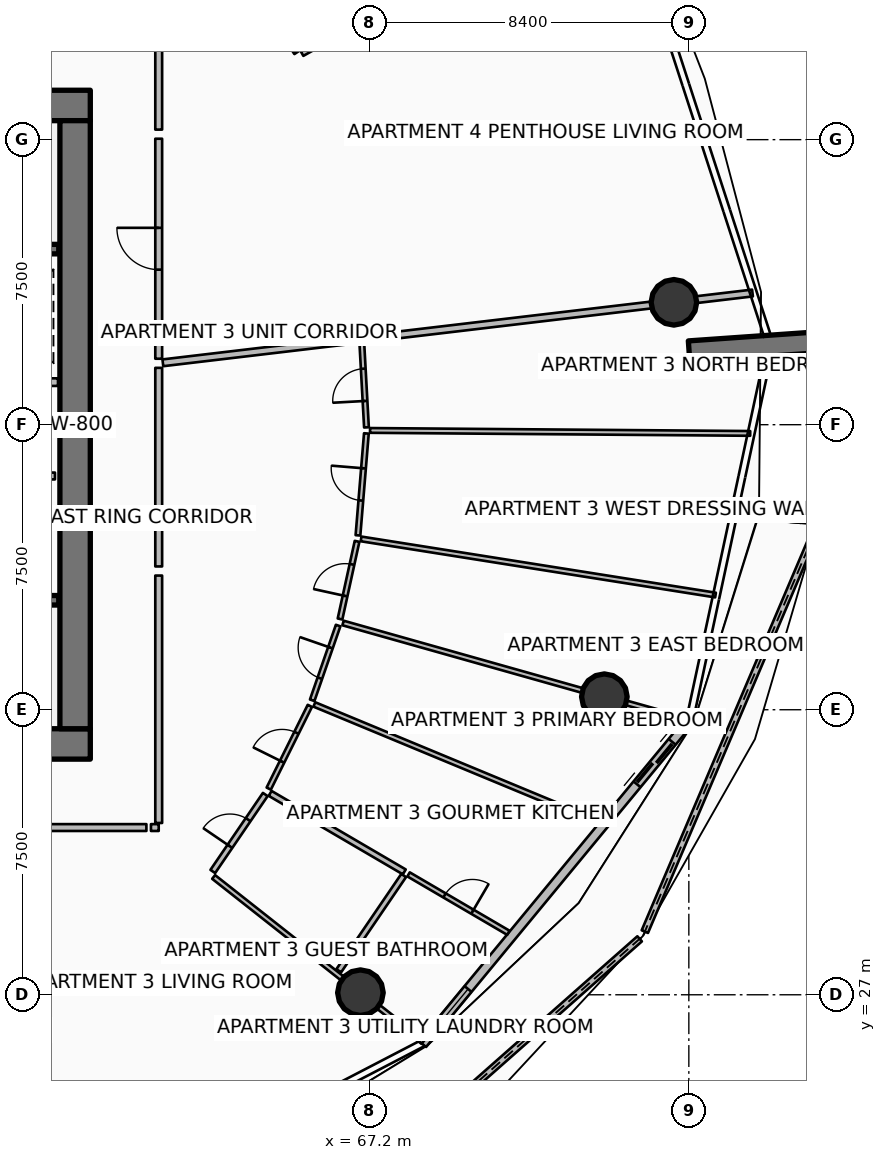
"""IFC4 building model, lengths in metres.
Left out: names, types, materials, properties, quantities, classifications, styles, units other than length and angle.
Written with IfcOpenShell. Run it as: python <this file> out.ifc"""

import sys

from ifc_helpers import new_model, si_unit, direction, frame, frame_2d, origin, origin_2d, place, context, subcontext, project, spatial, polyline, rectangle, circle, outline, extrude, element, fill, save


model = new_model("IFC4")
c1 = context("Model", 3, precision=1e-05, world=origin(), true_north=direction((0.0, 1.0)))
c2 = subcontext(c1, "Body", "Model", "MODEL_VIEW")
j1 = project(units=[si_unit("LENGTHUNIT", "METRE"), si_unit("PLANEANGLEUNIT", "RADIAN")], contexts=[c1])
p1 = place(None, origin())
s1 = spatial("IfcSite", under=j1, at=p1, CompositionType="ELEMENT")
p2 = place(p1, origin())
s2 = spatial("IfcBuilding", under=s1, at=p2, CompositionType="ELEMENT")
p3 = place(p2, frame((0.0, 0.0, 101.4)))
s3 = spatial("IfcBuildingStorey", under=s2, at=p3, CompositionType="ELEMENT", Elevation=101.4)
for number, where, z_axis, x_axis in (
    (1, (49.95, 33.6, 0.0), (0.0, 0.0, 1.0), (1.0, 0.0, 0.0)),
    (2, (49.95, 50.4, 0.0), (0.0, 0.0, 1.0), (1.0, 0.0, 0.0)),
):
    element("IfcWall", number, at=place(p3, frame(where, z_axis=z_axis, x_axis=x_axis)), inside=s3, PredefinedType="SHEAR", context=c2, shape_type="SweptSolid", body=[
        extrude(rectangle(XDim=9.9, YDim=0.8, at=frame_2d((4.95, 0.0))), origin(), (0.0, 0.0, 1.0), 3.75),
    ])
p4 = place(p3, frame((59.45, 34.0, 0.0), z_axis=(0.0, 0.0, 1.0), x_axis=(0.0, 1.0, 0.0)))
e3 = element("IfcWall", 3, at=p4, inside=s3, PredefinedType="SHEAR", context=c2, shape_type="SweptSolid", body=[
    extrude(rectangle(XDim=16.0, YDim=0.8, at=frame_2d((8.0, 0.0))), origin(), (0.0, 0.0, 1.0), 3.75),
])
p5 = place(p3, frame((75.606, 43.93, 0.0), z_axis=(0.0, 0.0, 1.0), x_axis=(0.997564163539, 0.069754853754, 0.0)))
e4 = element("IfcWall", 4, at=p5, inside=s3, PredefinedType="SOLIDWALL", context=c2, shape_type="SweptSolid", body=[
    extrude(rectangle(XDim=3.5, YDim=0.55, at=frame_2d((1.75, 0.0))), origin(), (0.0, 0.0, 1.0), 3.75),
])
for number, where, z_axis, x_axis in (
    (5, (66.958, 27.055, 0.0), (0.0, 0.0, 1.0), (1.0, 0.0, 0.0)),
    (6, (73.377, 34.843, 0.0), (0.0, 0.0, 1.0), (1.0, 0.0, 0.0)),
    (7, (75.207, 45.22, 0.0), (0.0, 0.0, 1.0), (1.0, 0.0, 0.0)),
):
    element("IfcColumn", number, at=place(p3, frame(where, z_axis=z_axis, x_axis=x_axis)), inside=s3, PredefinedType="COLUMN", context=c2, shape_type="SweptSolid", body=[
        extrude(circle(Radius=0.6, at=origin_2d()), origin(), (0.0, 0.0, 1.0), 3.5),
    ])
p6 = place(p3, frame((66.022, 21.158, 0.0), z_axis=(0.0, 0.0, 1.0), x_axis=(0.749623748339, 0.661864212604, 0.0)))
e8 = element("IfcWall", 8, at=p6, inside=s3, PredefinedType="PARAPET", context=c2, shape_type="SweptSolid", body=[
    extrude(outline(polyline([(0.0, 0.0), (11.05, 0.0), (11.05, 1.348), (5.525, 1.562), (0.0, 1.747), (0.0, 0.0)])), frame((0.0, 0.09, 0.0), z_axis=(0.0, -1.0, 0.0), x_axis=(1.0, 0.0, 0.0)), (0.0, 0.0, 1.0), 0.18),
])
p7 = place(p3, frame((74.442, 28.662, 0.0), z_axis=(0.0, 0.0, 1.0), x_axis=(0.391761113394, 0.920066970406, 0.0)))
e9 = element("IfcWall", 9, at=p7, inside=s3, PredefinedType="PARAPET", context=c2, shape_type="SweptSolid", body=[
    extrude(outline(polyline([(0.0, 0.0), (11.638, 0.0), (11.638, 1.12), (5.819, 1.182), (0.0, 1.348), (0.0, 0.0)])), frame((0.0, 0.09, 0.0), z_axis=(0.0, -1.0, 0.0), x_axis=(1.0, 0.0, 0.0)), (0.0, 0.0, 1.0), 0.18),
])
p8 = place(p3, frame((68.593, 25.702, 0.0), z_axis=(0.0, 0.0, 1.0), x_axis=(0.636704975, 0.771107498868, 0.0)))
e10 = element("IfcWall", 10, at=p8, inside=s3, PredefinedType="SOLIDWALL", context=c2, shape_type="SweptSolid", body=[
    extrude(rectangle(XDim=11.084, YDim=0.24, at=frame_2d((5.542, 0.0))), origin(), (0.0, 0.0, 1.0), 2.45),
])
p9 = place(p8, frame((8.864, 0.0, 0.0)))
e11 = element("IfcOpeningElement", 11, at=p9, cuts=e10, PredefinedType="OPENING", context=c2, shape_type="SweptSolid", body=[
    extrude(rectangle(XDim=1.45, YDim=2.15, at=frame_2d((0.725, 1.075))), frame((0.0, 0.13, 0.0), z_axis=(0.0, -1.0, 0.0), x_axis=(1.0, 0.0, 0.0)), (0.0, 0.0, 1.0), 0.26),
])
p10 = place(p8, frame((0.28, 0.0, 0.65)))
e12 = element("IfcOpeningElement", 12, at=p10, cuts=e10, PredefinedType="OPENING", context=c2, shape_type="SweptSolid", body=[
    extrude(rectangle(XDim=1.6, YDim=1.5, at=frame_2d((0.8, 0.75))), frame((0.0, 0.13, 0.0), z_axis=(0.0, -1.0, 0.0), x_axis=(1.0, 0.0, 0.0)), (0.0, 0.0, 1.0), 0.26),
])
p11 = place(p3, frame((51.48, 46.62, 0.0), z_axis=(0.0, 0.0, 1.0), x_axis=(1.0, 0.0, 0.0)))
e13 = element("IfcWall", 13, at=p11, inside=s3, PredefinedType="SOLIDWALL", context=c2, shape_type="SweptSolid", body=[
    extrude(rectangle(XDim=7.54, YDim=0.25, at=frame_2d((3.77, 0.0))), origin(), (0.0, 0.0, 1.0), 3.5),
])
p12 = place(p11, frame((0.3, 0.0, 0.0)))
e14 = element("IfcOpeningElement", 14, at=p12, cuts=e13, PredefinedType="OPENING", context=c2, shape_type="SweptSolid", body=[
    extrude(rectangle(XDim=1.55, YDim=2.15, at=frame_2d((0.775, 1.075))), frame((0.0, 0.135, 0.0), z_axis=(0.0, -1.0, 0.0), x_axis=(1.0, 0.0, 0.0)), (0.0, 0.0, 1.0), 0.27),
])
p13 = place(p3, frame((51.48, 37.38, 0.0), z_axis=(0.0, 0.0, 1.0), x_axis=(1.0, 0.0, 0.0)))
e15 = element("IfcWall", 15, at=p13, inside=s3, PredefinedType="SOLIDWALL", context=c2, shape_type="SweptSolid", body=[
    extrude(rectangle(XDim=7.54, YDim=0.25, at=frame_2d((3.77, 0.0))), origin(), (0.0, 0.0, 1.0), 3.5),
])
p14 = place(p13, frame((0.3, 0.0, 0.0)))
e16 = element("IfcOpeningElement", 16, at=p14, cuts=e15, PredefinedType="OPENING", context=c2, shape_type="SweptSolid", body=[
    extrude(rectangle(XDim=1.55, YDim=2.15, at=frame_2d((0.775, 1.075))), frame((0.0, 0.135, 0.0), z_axis=(0.0, -1.0, 0.0), x_axis=(1.0, 0.0, 0.0)), (0.0, 0.0, 1.0), 0.27),
])
p15 = place(p3, frame((52.42, 40.65, 0.0), z_axis=(0.0, 0.0, 1.0), x_axis=(1.0, 0.0, 0.0)))
e17 = element("IfcWall", 17, at=p15, inside=s3, PredefinedType="PARTITIONING", context=c2, shape_type="SweptSolid", body=[
    extrude(rectangle(XDim=6.5, YDim=0.18, at=frame_2d((3.25, 0.0))), origin(), (0.0, 0.0, 1.0), 3.5),
])
p16 = place(p15, frame((2.825, 0.0, 0.0)))
e18 = element("IfcOpeningElement", 18, at=p16, cuts=e17, PredefinedType="OPENING", context=c2, shape_type="SweptSolid", body=[
    extrude(rectangle(XDim=0.85, YDim=2.06, at=frame_2d((0.425, 1.03))), frame((0.0, 0.1, 0.0), z_axis=(0.0, -1.0, 0.0), x_axis=(1.0, 0.0, 0.0)), (0.0, 0.0, 1.0), 0.2),
])
p17 = place(p3, frame((50.12, 43.12, 0.0), z_axis=(0.0, 0.0, 1.0), x_axis=(1.0, 0.0, 0.0)))
e19 = element("IfcWall", 19, at=p17, inside=s3, PredefinedType="PARTITIONING", context=c2, shape_type="SweptSolid", body=[
    extrude(rectangle(XDim=8.88, YDim=0.2, at=frame_2d((4.44, 0.0))), origin(), (0.0, 0.0, 1.0), 3.5),
])
p18 = place(p3, frame((53.99, 31.304, 0.0), z_axis=(0.0, 0.0, 1.0), x_axis=(0.488628442553, -0.872491974249, 0.0)))
e20 = element("IfcWall", 20, at=p18, inside=s3, PredefinedType="PARTITIONING", context=c2, shape_type="SweptSolid", body=[
    extrude(rectangle(XDim=11.563, YDim=0.18, at=frame_2d((5.782, 0.0))), origin(), (0.0, 0.0, 1.0), 2.94),
])
p19 = place(p3, frame((61.759, 43.628, 0.0), z_axis=(0.0, 0.0, 1.0), x_axis=(0.99306822875, 0.117539325539, 0.0)))
e21 = element("IfcWall", 21, at=p19, inside=s3, PredefinedType="PARTITIONING", context=c2, shape_type="SweptSolid", body=[
    extrude(rectangle(XDim=15.624, YDim=0.18, at=frame_2d((7.812, 0.0))), origin(), (0.0, 0.0, 1.0), 2.94),
])
p20 = place(p3, frame((54.056, 31.4, 0.0), z_axis=(0.0, 0.0, 1.0), x_axis=(1.0, 0.0, 0.0)))
e22 = element("IfcWall", 22, at=p20, inside=s3, PredefinedType="PARTITIONING", context=c2, shape_type="SweptSolid", body=[
    extrude(rectangle(XDim=7.27, YDim=0.18, at=frame_2d((3.635, 0.0))), origin(), (0.0, 0.0, 1.0), 2.94),
])
p21 = place(p20, frame((3.085, 0.0, 0.0)))
e23 = element("IfcOpeningElement", 23, at=p21, cuts=e22, PredefinedType="OPENING", context=c2, shape_type="SweptSolid", body=[
    extrude(rectangle(XDim=1.1, YDim=2.1, at=frame_2d((0.55, 1.05))), frame((0.0, 0.1, 0.0), z_axis=(0.0, -1.0, 0.0), x_axis=(1.0, 0.0, 0.0)), (0.0, 0.0, 1.0), 0.2),
])
p22 = place(p3, frame((61.446, 31.4, 0.0), z_axis=(0.0, 0.0, 1.0), x_axis=(1.0, 0.0, 0.0)))
e24 = element("IfcWall", 24, at=p22, inside=s3, PredefinedType="PARTITIONING", context=c2, shape_type="SweptSolid", body=[
    extrude(rectangle(XDim=0.204, YDim=0.18, at=frame_2d((0.102, 0.0))), origin(), (0.0, 0.0, 1.0), 2.94),
])
p23 = place(p3, frame((61.65, 31.52, 0.0), z_axis=(0.0, 0.0, 1.0), x_axis=(0.0, 1.0, 0.0)))
e25 = element("IfcWall", 25, at=p23, inside=s3, PredefinedType="PARTITIONING", context=c2, shape_type="SweptSolid", body=[
    extrude(rectangle(XDim=6.51, YDim=0.18, at=frame_2d((3.255, 0.0))), origin(), (0.0, 0.0, 1.0), 2.94),
])
p24 = place(p3, frame((63.095, 30.1, 0.0), z_axis=(0.0, 0.0, 1.0), x_axis=(0.78530300145, -0.6191116183, 0.0)))
e26 = element("IfcWall", 26, at=p24, inside=s3, PredefinedType="PARTITIONING", context=c2, shape_type="SweptSolid", body=[
    extrude(rectangle(XDim=7.016, YDim=0.125, at=frame_2d((3.508, 0.0))), origin(), (0.0, 0.0, 1.0), 2.94),
])
p25 = place(p3, frame((63.073, 30.244, 0.0), z_axis=(0.0, 0.0, 1.0), x_axis=(0.563472809808, 0.826134609254, 0.0)))
e27 = element("IfcWall", 27, at=p25, inside=s3, PredefinedType="PARTITIONING", context=c2, shape_type="SweptSolid", body=[
    extrude(rectangle(XDim=2.451, YDim=0.15, at=frame_2d((1.226, 0.0))), origin(), (0.0, 0.0, 1.0), 2.94),
])
p26 = place(p25, frame((0.801, 0.0, 0.0)))
e28 = element("IfcOpeningElement", 28, at=p26, cuts=e27, PredefinedType="OPENING", context=c2, shape_type="SweptSolid", body=[
    extrude(rectangle(XDim=0.85, YDim=2.06, at=frame_2d((0.425, 1.03))), frame((0.0, 0.085, 0.0), z_axis=(0.0, -1.0, 0.0), x_axis=(1.0, 0.0, 0.0)), (0.0, 0.0, 1.0), 0.17),
])
p27 = place(p3, frame((66.387, 27.632, 0.0), z_axis=(0.0, 0.0, 1.0), x_axis=(0.563341818284, 0.826223938029, 0.0)))
e29 = element("IfcWall", 29, at=p27, inside=s3, PredefinedType="PARTITIONING", context=c2, shape_type="SweptSolid", body=[
    extrude(rectangle(XDim=3.034, YDim=0.15, at=frame_2d((1.517, 0.0))), origin(), (0.0, 0.0, 1.0), 2.94),
])
p28 = place(p3, frame((64.583, 32.298, 0.0), z_axis=(0.0, 0.0, 1.0), x_axis=(0.863128698129, -0.504984010109, 0.0)))
e30 = element("IfcWall", 30, at=p28, inside=s3, PredefinedType="PARTITIONING", context=c2, shape_type="SweptSolid", body=[
    extrude(rectangle(XDim=4.09, YDim=0.15, at=frame_2d((2.045, 0.0))), origin(), (0.0, 0.0, 1.0), 2.94),
])
p29 = place(p3, frame((68.225, 30.167, 0.0), z_axis=(0.0, 0.0, 1.0), x_axis=(0.863132180625, -0.504978057711, 0.0)))
e31 = element("IfcWall", 31, at=p29, inside=s3, PredefinedType="PARTITIONING", context=c2, shape_type="SweptSolid", body=[
    extrude(rectangle(XDim=3.043, YDim=0.125, at=frame_2d((1.521, 0.0))), origin(), (0.0, 0.0, 1.0), 2.94),
])
p30 = place(p29, frame((1.096, 0.0, 0.0)))
e32 = element("IfcOpeningElement", 32, at=p30, cuts=e31, PredefinedType="OPENING", context=c2, shape_type="SweptSolid", body=[
    extrude(rectangle(XDim=0.85, YDim=2.06, at=frame_2d((0.425, 1.03))), frame((0.0, 0.073, 0.0), z_axis=(0.0, -1.0, 0.0), x_axis=(1.0, 0.0, 0.0)), (0.0, 0.0, 1.0), 0.145),
])
p31 = place(p3, frame((65.746, 34.639, 0.0), z_axis=(0.0, 0.0, 1.0), x_axis=(0.923687629783, -0.383146398373, 0.0)))
e33 = element("IfcWall", 33, at=p31, inside=s3, PredefinedType="PARTITIONING", context=c2, shape_type="SweptSolid", body=[
    extrude(rectangle(XDim=8.122, YDim=0.125, at=frame_2d((4.061, 0.0))), origin(), (0.0, 0.0, 1.0), 2.94),
])
p32 = place(p3, frame((64.545, 32.424, 0.0), z_axis=(0.0, 0.0, 1.0), x_axis=(0.445043296976, 0.895509052895, 0.0)))
e34 = element("IfcWall", 34, at=p32, inside=s3, PredefinedType="PARTITIONING", context=c2, shape_type="SweptSolid", body=[
    extrude(rectangle(XDim=2.431, YDim=0.125, at=frame_2d((1.216, 0.0))), origin(), (0.0, 0.0, 1.0), 2.94),
])
p33 = place(p32, frame((0.791, 0.0, 0.0)))
e35 = element("IfcOpeningElement", 35, at=p33, cuts=e34, PredefinedType="OPENING", context=c2, shape_type="SweptSolid", body=[
    extrude(rectangle(XDim=0.85, YDim=2.06, at=frame_2d((0.425, 1.03))), frame((0.0, 0.073, 0.0), z_axis=(0.0, -1.0, 0.0), x_axis=(1.0, 0.0, 0.0)), (0.0, 0.0, 1.0), 0.145),
])
p34 = place(p3, frame((65.689, 34.749, 0.0), z_axis=(0.0, 0.0, 1.0), x_axis=(0.327956443315, 0.944692844944, 0.0)))
e36 = element("IfcWall", 36, at=p34, inside=s3, PredefinedType="PARTITIONING", context=c2, shape_type="SweptSolid", body=[
    extrude(rectangle(XDim=2.082, YDim=0.125, at=frame_2d((1.041, 0.0))), origin(), (0.0, 0.0, 1.0), 2.94),
])
p35 = place(p34, frame((0.615, 0.0, 0.0)))
e37 = element("IfcOpeningElement", 37, at=p35, cuts=e36, PredefinedType="OPENING", context=c2, shape_type="SweptSolid", body=[
    extrude(rectangle(XDim=0.85, YDim=2.06, at=frame_2d((0.425, 1.03))), frame((0.0, 0.073, 0.0), z_axis=(0.0, -1.0, 0.0), x_axis=(1.0, 0.0, 0.0)), (0.0, 0.0, 1.0), 0.145),
])
p36 = place(p3, frame((61.65, 38.27, 0.0), z_axis=(0.0, 0.0, 1.0), x_axis=(0.0, 1.0, 0.0)))
e38 = element("IfcWall", 38, at=p36, inside=s3, PredefinedType="PARTITIONING", context=c2, shape_type="SweptSolid", body=[
    extrude(rectangle(XDim=5.225, YDim=0.18, at=frame_2d((2.613, 0.0))), origin(), (0.0, 0.0, 1.0), 2.94),
])
p37 = place(p3, frame((66.5, 36.782, 0.0), z_axis=(0.0, 0.0, 1.0), x_axis=(0.962451600307, -0.271453342338, 0.0)))
e39 = element("IfcWall", 39, at=p37, inside=s3, PredefinedType="PARTITIONING", context=c2, shape_type="SweptSolid", body=[
    extrude(rectangle(XDim=9.349, YDim=0.125, at=frame_2d((4.675, 0.0))), origin(), (0.0, 0.0, 1.0), 2.94),
])
p38 = place(p3, frame((66.976, 38.995, 0.0), z_axis=(0.0, 0.0, 1.0), x_axis=(0.987686752204, -0.156444493419, 0.0)))
e40 = element("IfcWall", 40, at=p38, inside=s3, PredefinedType="PARTITIONING", context=c2, shape_type="SweptSolid", body=[
    extrude(rectangle(XDim=9.443, YDim=0.125, at=frame_2d((4.721, 0.0))), origin(), (0.0, 0.0, 1.0), 2.94),
])
p39 = place(p3, frame((67.211, 41.849, 0.0), z_axis=(0.0, 0.0, 1.0), x_axis=(0.999969120795, -0.007858591192, 0.0)))
e41 = element("IfcWall", 41, at=p39, inside=s3, PredefinedType="PARTITIONING", context=c2, shape_type="SweptSolid", body=[
    extrude(rectangle(XDim=10.003, YDim=0.125, at=frame_2d((5.002, 0.0))), origin(), (0.0, 0.0, 1.0), 2.94),
])
p40 = place(p3, frame((66.421, 36.888, 0.0), z_axis=(0.0, 0.0, 1.0), x_axis=(0.21430951395, 0.97676580214, 0.0)))
e42 = element("IfcWall", 42, at=p40, inside=s3, PredefinedType="PARTITIONING", context=c2, shape_type="SweptSolid", body=[
    extrude(rectangle(XDim=2.092, YDim=0.125, at=frame_2d((1.046, 0.0))), origin(), (0.0, 0.0, 1.0), 2.94),
])
p41 = place(p40, frame((0.621, 0.0, 0.0)))
e43 = element("IfcOpeningElement", 43, at=p41, cuts=e42, PredefinedType="OPENING", context=c2, shape_type="SweptSolid", body=[
    extrude(rectangle(XDim=0.85, YDim=2.06, at=frame_2d((0.425, 1.03))), frame((0.0, 0.073, 0.0), z_axis=(0.0, -1.0, 0.0), x_axis=(1.0, 0.0, 0.0)), (0.0, 0.0, 1.0), 0.145),
])
p42 = place(p3, frame((66.893, 39.088, 0.0), z_axis=(0.0, 0.0, 1.0), x_axis=(0.082294564914, 0.996608049629, 0.0)))
e44 = element("IfcWall", 44, at=p42, inside=s3, PredefinedType="PARTITIONING", context=c2, shape_type="SweptSolid", body=[
    extrude(rectangle(XDim=2.691, YDim=0.125, at=frame_2d((1.345, 0.0))), origin(), (0.0, 0.0, 1.0), 2.94),
])
p43 = place(p42, frame((0.92, 0.0, 0.0)))
e45 = element("IfcOpeningElement", 45, at=p43, cuts=e44, PredefinedType="OPENING", context=c2, shape_type="SweptSolid", body=[
    extrude(rectangle(XDim=0.85, YDim=2.06, at=frame_2d((0.425, 1.03))), frame((0.0, 0.073, 0.0), z_axis=(0.0, -1.0, 0.0), x_axis=(1.0, 0.0, 0.0)), (0.0, 0.0, 1.0), 0.145),
])
p44 = place(p3, frame((67.117, 41.93, 0.0), z_axis=(0.0, 0.0, 1.0), x_axis=(-0.054896910866, 0.998492027598, 0.0)))
e46 = element("IfcWall", 46, at=p44, inside=s3, PredefinedType="PARTITIONING", context=c2, shape_type="SweptSolid", body=[
    extrude(rectangle(XDim=2.241, YDim=0.125, at=frame_2d((1.121, 0.0))), origin(), (0.0, 0.0, 1.0), 2.94),
])
p45 = place(p44, frame((0.696, 0.0, 0.0)))
e47 = element("IfcOpeningElement", 47, at=p45, cuts=e46, PredefinedType="OPENING", context=c2, shape_type="SweptSolid", body=[
    extrude(rectangle(XDim=0.85, YDim=2.06, at=frame_2d((0.425, 1.03))), frame((0.0, 0.073, 0.0), z_axis=(0.0, -1.0, 0.0), x_axis=(1.0, 0.0, 0.0)), (0.0, 0.0, 1.0), 0.145),
])
p46 = place(p3, frame((61.65, 43.736, 0.0), z_axis=(0.0, 0.0, 1.0), x_axis=(0.0, 1.0, 0.0)))
e48 = element("IfcWall", 48, at=p46, inside=s3, PredefinedType="PARTITIONING", context=c2, shape_type="SweptSolid", body=[
    extrude(rectangle(XDim=5.789, YDim=0.18, at=frame_2d((2.895, 0.0))), origin(), (0.0, 0.0, 1.0), 2.94),
])
p47 = place(p46, frame((2.344, 0.0, 0.0)))
e49 = element("IfcOpeningElement", 49, at=p47, cuts=e48, PredefinedType="OPENING", context=c2, shape_type="SweptSolid", body=[
    extrude(rectangle(XDim=1.1, YDim=2.1, at=frame_2d((0.55, 1.05))), frame((0.0, 0.1, 0.0), z_axis=(0.0, -1.0, 0.0), x_axis=(1.0, 0.0, 0.0)), (0.0, 0.0, 1.0), 0.2),
])
p48 = place(p3, frame((61.65, 49.764, 0.0), z_axis=(0.0, 0.0, 1.0), x_axis=(0.0, 1.0, 0.0)))
e50 = element("IfcWall", 50, at=p48, inside=s3, PredefinedType="PARTITIONING", context=c2, shape_type="SweptSolid", body=[
    extrude(rectangle(XDim=2.716, YDim=0.18, at=frame_2d((1.358, 0.0))), origin(), (0.0, 0.0, 1.0), 2.94),
])
p49 = place(p3, frame((65.425, 51.759, 0.0), z_axis=(0.0, 0.0, 1.0), x_axis=(0.872502512898, 0.488609624328, 0.0)))
e51 = element("IfcWall", 51, at=p49, inside=s3, PredefinedType="PARTITIONING", context=c2, shape_type="SweptSolid", body=[
    extrude(rectangle(XDim=9.508, YDim=0.125, at=frame_2d((4.754, 0.0))), origin(), (0.0, 0.0, 1.0), 2.94),
])
p50 = place(p3, frame((65.283, 51.793, 0.0), z_axis=(0.0, 0.0, 1.0), x_axis=(-0.55052065121, 0.834821545357, 0.0)))
e52 = element("IfcWall", 52, at=p50, inside=s3, PredefinedType="PARTITIONING", context=c2, shape_type="SweptSolid", body=[
    extrude(rectangle(XDim=2.687, YDim=0.15, at=frame_2d((1.344, 0.0))), origin(), (0.0, 0.0, 1.0), 2.94),
])
p51 = place(p50, frame((0.918, 0.0, 0.0)))
e53 = element("IfcOpeningElement", 53, at=p51, cuts=e52, PredefinedType="OPENING", context=c2, shape_type="SweptSolid", body=[
    extrude(rectangle(XDim=0.85, YDim=2.06, at=frame_2d((0.425, 1.03))), frame((0.0, 0.085, 0.0), z_axis=(0.0, -1.0, 0.0), x_axis=(1.0, 0.0, 0.0)), (0.0, 0.0, 1.0), 0.17),
])
p52 = place(p9, origin())
e54 = element("IfcDoor", 54, at=p52, inside=s3, OperationType="DOUBLE_DOOR_SLIDING", PredefinedType="DOOR", context=c2, shape_type="SweptSolid", body=[
    extrude(rectangle(XDim=1.45, YDim=2.15, at=frame_2d((0.725, 1.075))), frame((0.0, 0.025, 0.0), z_axis=(0.0, -1.0, 0.0), x_axis=(1.0, 0.0, 0.0)), (0.0, 0.0, 1.0), 0.05),
])
fill(e11, e54)
p53 = place(p10, origin())
e55 = element("IfcWindow", 55, at=p53, inside=s3, PartitioningType="SINGLE_PANEL", PredefinedType="WINDOW", context=c2, shape_type="SweptSolid", body=[
    extrude(rectangle(XDim=1.6, YDim=1.5, at=frame_2d((0.8, 0.75))), frame((0.0, 0.03, 0.0), z_axis=(0.0, -1.0, 0.0), x_axis=(1.0, 0.0, 0.0)), (0.0, 0.0, 1.0), 0.06),
])
fill(e12, e55)
p54 = place(p26, origin())
e56 = element("IfcDoor", 56, at=p54, inside=s3, OperationType="SINGLE_SWING_LEFT", PredefinedType="DOOR", context=c2, shape_type="SweptSolid", body=[
    extrude(rectangle(XDim=0.85, YDim=2.06, at=frame_2d((0.425, 1.03))), frame((0.0, 0.025, 0.0), z_axis=(0.0, -1.0, 0.0), x_axis=(1.0, 0.0, 0.0)), (0.0, 0.0, 1.0), 0.05),
])
fill(e28, e56)
p55 = place(p30, origin())
e57 = element("IfcDoor", 57, at=p55, inside=s3, OperationType="SINGLE_SWING_RIGHT", PredefinedType="DOOR", context=c2, shape_type="SweptSolid", body=[
    extrude(rectangle(XDim=0.85, YDim=2.06, at=frame_2d((0.425, 1.03))), frame((0.0, 0.025, 0.0), z_axis=(0.0, -1.0, 0.0), x_axis=(1.0, 0.0, 0.0)), (0.0, 0.0, 1.0), 0.05),
])
fill(e32, e57)
p56 = place(p33, origin())
e58 = element("IfcDoor", 58, at=p56, inside=s3, OperationType="SINGLE_SWING_LEFT", PredefinedType="DOOR", context=c2, shape_type="SweptSolid", body=[
    extrude(rectangle(XDim=0.85, YDim=2.06, at=frame_2d((0.425, 1.03))), frame((0.0, 0.025, 0.0), z_axis=(0.0, -1.0, 0.0), x_axis=(1.0, 0.0, 0.0)), (0.0, 0.0, 1.0), 0.05),
])
fill(e35, e58)
p57 = place(p35, origin())
e59 = element("IfcDoor", 59, at=p57, inside=s3, OperationType="SINGLE_SWING_RIGHT", PredefinedType="DOOR", context=c2, shape_type="SweptSolid", body=[
    extrude(rectangle(XDim=0.85, YDim=2.06, at=frame_2d((0.425, 1.03))), frame((0.0, 0.025, 0.0), z_axis=(0.0, -1.0, 0.0), x_axis=(1.0, 0.0, 0.0)), (0.0, 0.0, 1.0), 0.05),
])
fill(e37, e59)
p58 = place(p41, origin())
e60 = element("IfcDoor", 60, at=p58, inside=s3, OperationType="SINGLE_SWING_LEFT", PredefinedType="DOOR", context=c2, shape_type="SweptSolid", body=[
    extrude(rectangle(XDim=0.85, YDim=2.06, at=frame_2d((0.425, 1.03))), frame((0.0, 0.025, 0.0), z_axis=(0.0, -1.0, 0.0), x_axis=(1.0, 0.0, 0.0)), (0.0, 0.0, 1.0), 0.05),
])
fill(e43, e60)
p59 = place(p43, origin())
e61 = element("IfcDoor", 61, at=p59, inside=s3, OperationType="SINGLE_SWING_RIGHT", PredefinedType="DOOR", context=c2, shape_type="SweptSolid", body=[
    extrude(rectangle(XDim=0.85, YDim=2.06, at=frame_2d((0.425, 1.03))), frame((0.0, 0.025, 0.0), z_axis=(0.0, -1.0, 0.0), x_axis=(1.0, 0.0, 0.0)), (0.0, 0.0, 1.0), 0.05),
])
fill(e45, e61)
p60 = place(p45, origin())
e62 = element("IfcDoor", 62, at=p60, inside=s3, OperationType="SINGLE_SWING_LEFT", PredefinedType="DOOR", context=c2, shape_type="SweptSolid", body=[
    extrude(rectangle(XDim=0.85, YDim=2.06, at=frame_2d((0.425, 1.03))), frame((0.0, 0.025, 0.0), z_axis=(0.0, -1.0, 0.0), x_axis=(1.0, 0.0, 0.0)), (0.0, 0.0, 1.0), 0.05),
])
fill(e47, e62)
p61 = place(p47, origin())
e63 = element("IfcDoor", 63, at=p61, inside=s3, OperationType="SINGLE_SWING_RIGHT", PredefinedType="DOOR", context=c2, shape_type="SweptSolid", body=[
    extrude(rectangle(XDim=1.1, YDim=2.1, at=frame_2d((0.55, 1.05))), frame((0.0, 0.025, 0.0), z_axis=(0.0, -1.0, 0.0), x_axis=(1.0, 0.0, 0.0)), (0.0, 0.0, 1.0), 0.05),
])
fill(e49, e63)
save(model, sys.argv[1])
